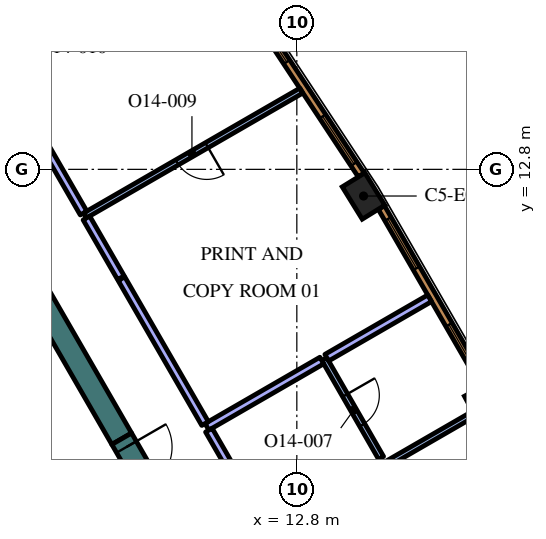
"""IFC4 building model, lengths in metres.
Left out: names, types, materials, properties, quantities, classifications, styles, units other than length and angle.
Written with IfcOpenShell. Run it as: python <this file> out.ifc"""

import sys

from ifc_helpers import new_model, si_unit, direction, frame, frame_2d, origin, origin_2d, place, context, subcontext, project, spatial, rectangle, extrude, element, fill, save


model = new_model("IFC4")
c1 = context("Model", 3, precision=1e-05, world=origin(), true_north=direction((0.0, 1.0)))
c2 = subcontext(c1, "Body", "Model", "MODEL_VIEW")
j1 = project(units=[si_unit("LENGTHUNIT", "METRE"), si_unit("PLANEANGLEUNIT", "RADIAN")], contexts=[c1])
p1 = place(None, origin())
s1 = spatial("IfcSite", under=j1, at=p1, CompositionType="ELEMENT")
p2 = place(p1, origin())
s2 = spatial("IfcBuilding", under=s1, at=p2, CompositionType="ELEMENT")
p3 = place(p2, frame((0.0, 0.0, 309.0)))
s3 = spatial("IfcBuildingStorey", under=s2, at=p3, CompositionType="ELEMENT", Elevation=309.0)
for number, where, z_axis, x_axis in (
    (1, (17.756, 6.557, 0.0), (0.0, 0.0, 1.0), (-0.474, 0.881, 0.0)),
    (2, (14.556, 12.098, 0.0), (0.0, 0.0, 1.0), (-0.526, 0.851, 0.0)),
):
    element("IfcColumn", number, at=place(p3, frame(where, z_axis=z_axis, x_axis=x_axis)), inside=s3, PredefinedType="COLUMN", context=c2, shape_type="SweptSolid", body=[
        extrude(rectangle(XDim=1.0, YDim=0.7, at=origin_2d()), origin(), (0.0, 0.0, 1.0), 4.2),
    ])
p4 = place(p3, frame((1.989, 16.456, 0.0), z_axis=(0.0, 0.0, 1.0), x_axis=(0.49999102663, -0.8660305845, 0.0)))
e3 = element("IfcWall", 3, at=p4, inside=s3, PredefinedType="SOLIDWALL", context=c2, shape_type="SweptSolid", body=[
    extrude(rectangle(XDim=12.406, YDim=0.6, at=frame_2d((6.203, 0.0))), origin(), (0.0, 0.0, 1.0), 4.2),
])
p5 = place(p3, frame((6.568, -3.627, 0.0), z_axis=(0.0, 0.0, 1.0), x_axis=(-0.499999455981, 0.866025717874, 0.0)))
e4 = element("IfcWall", 4, at=p5, inside=s3, PredefinedType="SOLIDWALL", context=c2, shape_type="SweptSolid", body=[
    extrude(rectangle(XDim=11.978, YDim=0.25, at=frame_2d((5.989, 0.0))), origin(), (0.0, 0.0, 1.0), 4.2),
])
p6 = place(p3, frame((8.565, -2.185, 0.0), z_axis=(0.0, 0.0, 1.0), x_axis=(-0.499997954832, 0.866026584559, 0.0)))
e5 = element("IfcWall", 5, at=p6, inside=s3, PredefinedType="SOLIDWALL", context=c2, shape_type="SweptSolid", body=[
    extrude(rectangle(XDim=12.35, YDim=0.25, at=frame_2d((6.175, 0.0))), origin(), (0.0, 0.0, 1.0), 4.2),
])
p7 = place(p6, frame((0.685, 0.0, 0.0)))
e6 = element("IfcOpeningElement", 6, at=p7, cuts=e5, PredefinedType="OPENING", context=c2, shape_type="SweptSolid", body=[
    extrude(rectangle(XDim=0.9, YDim=2.1, at=frame_2d((0.45, 1.05))), frame((0.0, 0.135, 0.0), z_axis=(0.0, -1.0, 0.0), x_axis=(1.0, 0.0, 0.0)), (0.0, 0.0, 1.0), 0.27),
])
p8 = place(p6, frame((3.105, 0.0, 0.0)))
e7 = element("IfcOpeningElement", 7, at=p8, cuts=e5, PredefinedType="OPENING", context=c2, shape_type="SweptSolid", body=[
    extrude(rectangle(XDim=1.1, YDim=2.1, at=frame_2d((0.55, 1.05))), frame((0.0, 0.135, 0.0), z_axis=(0.0, -1.0, 0.0), x_axis=(1.0, 0.0, 0.0)), (0.0, 0.0, 1.0), 0.27),
])
p9 = place(p6, frame((5.625, 0.0, 0.0)))
e8 = element("IfcOpeningElement", 8, at=p9, cuts=e5, PredefinedType="OPENING", context=c2, shape_type="SweptSolid", body=[
    extrude(rectangle(XDim=1.1, YDim=2.1, at=frame_2d((0.55, 1.05))), frame((0.0, 0.135, 0.0), z_axis=(0.0, -1.0, 0.0), x_axis=(1.0, 0.0, 0.0)), (0.0, 0.0, 1.0), 0.27),
])
p10 = place(p6, frame((8.145, 0.0, 0.0)))
e9 = element("IfcOpeningElement", 9, at=p10, cuts=e5, PredefinedType="OPENING", context=c2, shape_type="SweptSolid", body=[
    extrude(rectangle(XDim=1.1, YDim=2.1, at=frame_2d((0.55, 1.05))), frame((0.0, 0.135, 0.0), z_axis=(0.0, -1.0, 0.0), x_axis=(1.0, 0.0, 0.0)), (0.0, 0.0, 1.0), 0.27),
])
p11 = place(p6, frame((10.665, 0.0, 0.0)))
e10 = element("IfcOpeningElement", 10, at=p11, cuts=e5, PredefinedType="OPENING", context=c2, shape_type="SweptSolid", body=[
    extrude(rectangle(XDim=1.1, YDim=2.1, at=frame_2d((0.55, 1.05))), frame((0.0, 0.135, 0.0), z_axis=(0.0, -1.0, 0.0), x_axis=(1.0, 0.0, 0.0)), (0.0, 0.0, 1.0), 0.27),
])
p12 = place(p3, frame((8.192, 5.711, 0.0), z_axis=(0.0, 0.0, 1.0), x_axis=(0.500062241894, -0.865989465428, 0.0)))
e11 = element("IfcWall", 11, at=p12, inside=s3, PredefinedType="SOLIDWALL", context=c2, shape_type="SweptSolid", body=[
    extrude(rectangle(XDim=1.7, YDim=0.6, at=frame_2d((0.85, 0.0))), origin(), (0.0, 0.0, 1.0), 4.2),
])
p13 = place(p12, frame((0.25, 0.0, 0.0)))
e12 = element("IfcOpeningElement", 12, at=p13, cuts=e11, PredefinedType="OPENING", context=c2, shape_type="SweptSolid", body=[
    extrude(rectangle(XDim=1.2, YDim=2.1, at=frame_2d((0.6, 1.05))), frame((0.0, 0.31, 0.0), z_axis=(0.0, -1.0, 0.0), x_axis=(1.0, 0.0, 0.0)), (0.0, 0.0, 1.0), 0.62),
])
p14 = place(p3, frame((15.124, 5.022, 0.0), z_axis=(0.0, 0.0, 1.0), x_axis=(0.866010629317, 0.500025589255, 0.0)))
e13 = element("IfcWall", 13, at=p14, inside=s3, PredefinedType="PARTITIONING", context=c2, shape_type="SweptSolid", body=[
    extrude(rectangle(XDim=2.696, YDim=0.15, at=frame_2d((1.348, 0.0))), origin(), (0.0, 0.0, 1.0), 3.55),
])
p15 = place(p3, frame((13.523, 7.808, 0.0), z_axis=(0.0, 0.0, 1.0), x_axis=(0.498338040698, -0.866982812513, 0.0)))
e14 = element("IfcWall", 14, at=p15, inside=s3, PredefinedType="PARTITIONING", context=c2, shape_type="SweptSolid", body=[
    extrude(rectangle(XDim=2.999, YDim=0.15, at=frame_2d((1.5, 0.0))), origin(), (0.0, 0.0, 1.0), 3.55),
])
p16 = place(p15, frame((1.099, 0.0, 0.0)))
e15 = element("IfcOpeningElement", 15, at=p16, cuts=e14, PredefinedType="OPENING", context=c2, shape_type="SweptSolid", body=[
    extrude(rectangle(XDim=0.9, YDim=2.1, at=frame_2d((0.45, 1.05))), frame((0.0, 0.085, 0.0), z_axis=(0.0, -1.0, 0.0), x_axis=(1.0, 0.0, 0.0)), (0.0, 0.0, 1.0), 0.17),
])
p17 = place(p3, frame((13.588, 7.845, 0.0), z_axis=(0.0, 0.0, 1.0), x_axis=(0.866022959057, 0.500004234368, 0.0)))
e16 = element("IfcWall", 16, at=p17, inside=s3, PredefinedType="PARTITIONING", context=c2, shape_type="SweptSolid", body=[
    extrude(rectangle(XDim=3.125, YDim=0.2, at=frame_2d((1.562, 0.0))), origin(), (0.0, 0.0, 1.0), 3.55),
])
p18 = place(p3, frame((10.436, 6.025, 0.0), z_axis=(0.0, 0.0, 1.0), x_axis=(0.866030664334, 0.49999088835, 0.0)))
e17 = element("IfcWall", 17, at=p18, inside=s3, PredefinedType="PARTITIONING", context=c2, shape_type="SweptSolid", body=[
    extrude(rectangle(XDim=3.49, YDim=0.2, at=frame_2d((1.745, 0.0))), origin(), (0.0, 0.0, 1.0), 3.55),
])
p19 = place(p3, frame((12.686, 2.128, 0.0), z_axis=(0.0, 0.0, 1.0), x_axis=(-0.499988222896, 0.866032203192, 0.0)))
e18 = element("IfcWall", 18, at=p19, inside=s3, PredefinedType="PARTITIONING", context=c2, shape_type="SweptSolid", body=[
    extrude(rectangle(XDim=4.4, YDim=0.2, at=frame_2d((2.2, 0.0))), origin(), (0.0, 0.0, 1.0), 3.55),
])
p20 = place(p3, frame((12.918, 14.872, 0.0), z_axis=(0.0, 0.0, 1.0), x_axis=(-0.866033427365, -0.499986102494, 0.0)))
e19 = element("IfcWall", 19, at=p20, inside=s3, PredefinedType="PARTITIONING", context=c2, shape_type="SweptSolid", body=[
    extrude(rectangle(XDim=6.573, YDim=0.15, at=frame_2d((3.287, 0.0))), origin(), (0.0, 0.0, 1.0), 3.55),
])
p21 = place(p20, frame((2.873, 0.0, 0.0)))
e20 = element("IfcOpeningElement", 20, at=p21, cuts=e19, PredefinedType="OPENING", context=c2, shape_type="SweptSolid", body=[
    extrude(rectangle(XDim=0.9, YDim=2.1, at=frame_2d((0.45, 1.05))), frame((0.0, 0.085, 0.0), z_axis=(0.0, -1.0, 0.0), x_axis=(1.0, 0.0, 0.0)), (0.0, 0.0, 1.0), 0.17),
])
p22 = place(p3, frame((10.385, 6.112, 0.0), z_axis=(0.0, 0.0, 1.0), x_axis=(-0.499988222896, 0.866032203192, 0.0)))
e21 = element("IfcWall", 21, at=p22, inside=s3, PredefinedType="PARTITIONING", context=c2, shape_type="SweptSolid", body=[
    extrude(rectangle(XDim=4.4, YDim=0.2, at=frame_2d((2.2, 0.0))), origin(), (0.0, 0.0, 1.0), 3.55),
])
p23 = place(p3, frame((8.171, 9.948, 0.0), z_axis=(0.0, 0.0, 1.0), x_axis=(-0.500044545065, 0.865999684151, 0.0)))
e22 = element("IfcWall", 22, at=p23, inside=s3, PredefinedType="PARTITIONING", context=c2, shape_type="SweptSolid", body=[
    extrude(rectangle(XDim=1.815, YDim=0.2, at=frame_2d((0.908, 0.0))), origin(), (0.0, 0.0, 1.0), 3.55),
])
p24 = place(p3, frame((7.188, 11.65, 0.0), z_axis=(0.0, 0.0, 1.0), x_axis=(-0.499986368499, 0.866033273792, 0.0)))
e23 = element("IfcWall", 23, at=p24, inside=s3, PredefinedType="PARTITIONING", context=c2, shape_type="SweptSolid", body=[
    extrude(rectangle(XDim=7.794, YDim=0.2, at=frame_2d((3.897, 0.0))), origin(), (0.0, 0.0, 1.0), 3.55),
])
p25 = place(p24, frame((3.4, 0.0, 0.0)))
e24 = element("IfcOpeningElement", 24, at=p25, cuts=e23, PredefinedType="OPENING", context=c2, shape_type="SweptSolid", body=[
    extrude(rectangle(XDim=1.0, YDim=2.1, at=frame_2d((0.5, 1.05))), frame((0.0, 0.11, 0.0), z_axis=(0.0, -1.0, 0.0), x_axis=(1.0, 0.0, 0.0)), (0.0, 0.0, 1.0), 0.22),
])
p26 = place(p3, frame((17.728, 7.114, 0.0), z_axis=(0.0, 0.0, 1.0), x_axis=(-0.500024767483, 0.866011103799, 0.0)))
e25 = element("IfcWall", 25, at=p26, inside=s3, PredefinedType="SOLIDWALL", context=c2, shape_type="SweptSolid", body=[
    extrude(rectangle(XDim=5.406, YDim=0.19, at=frame_2d((2.703, 0.0))), origin(), (0.0, 0.0, 1.0), 3.95),
])
p27 = place(p26, frame((0.346, 0.0, 0.6)))
e26 = element("IfcOpeningElement", 26, at=p27, cuts=e25, PredefinedType="OPENING", context=c2, shape_type="SweptSolid", body=[
    extrude(rectangle(XDim=1.5, YDim=2.85, at=frame_2d((0.75, 1.425))), frame((0.0, 0.105, 0.0), z_axis=(0.0, -1.0, 0.0), x_axis=(1.0, 0.0, 0.0)), (0.0, 0.0, 1.0), 0.21),
])
p28 = place(p26, frame((3.56, 0.0, 0.6)))
e27 = element("IfcOpeningElement", 27, at=p28, cuts=e25, PredefinedType="OPENING", context=c2, shape_type="SweptSolid", body=[
    extrude(rectangle(XDim=1.5, YDim=2.85, at=frame_2d((0.75, 1.425))), frame((0.0, 0.105, 0.0), z_axis=(0.0, -1.0, 0.0), x_axis=(1.0, 0.0, 0.0)), (0.0, 0.0, 1.0), 0.21),
])
p29 = place(p3, frame((14.496, 12.653, 0.0), z_axis=(0.0, 0.0, 1.0), x_axis=(-0.550744054781, 0.83467417962, 0.0)))
e28 = element("IfcWall", 28, at=p29, inside=s3, PredefinedType="SOLIDWALL", context=c2, shape_type="SweptSolid", body=[
    extrude(rectangle(XDim=5.406, YDim=0.19, at=frame_2d((2.703, 0.0))), origin(), (0.0, 0.0, 1.0), 3.95),
])
p30 = place(p29, frame((0.346, 0.0, 0.6)))
e29 = element("IfcOpeningElement", 29, at=p30, cuts=e28, PredefinedType="OPENING", context=c2, shape_type="SweptSolid", body=[
    extrude(rectangle(XDim=1.5, YDim=2.85, at=frame_2d((0.75, 1.425))), frame((0.0, 0.105, 0.0), z_axis=(0.0, -1.0, 0.0), x_axis=(1.0, 0.0, 0.0)), (0.0, 0.0, 1.0), 0.21),
])
p31 = place(p29, frame((3.559, 0.0, 0.6)))
e30 = element("IfcOpeningElement", 30, at=p31, cuts=e28, PredefinedType="OPENING", context=c2, shape_type="SweptSolid", body=[
    extrude(rectangle(XDim=1.5, YDim=2.85, at=frame_2d((0.75, 1.425))), frame((0.0, 0.105, 0.0), z_axis=(0.0, -1.0, 0.0), x_axis=(1.0, 0.0, 0.0)), (0.0, 0.0, 1.0), 0.21),
])
p32 = place(p13, origin())
e31 = element("IfcDoor", 31, at=p32, inside=s3, OperationType="SINGLE_SWING_LEFT", PredefinedType="DOOR", context=c2, shape_type="SweptSolid", body=[
    extrude(rectangle(XDim=1.2, YDim=2.1, at=frame_2d((0.6, 1.05))), frame((0.0, 0.025, 0.0), z_axis=(0.0, -1.0, 0.0), x_axis=(1.0, 0.0, 0.0)), (0.0, 0.0, 1.0), 0.05),
])
fill(e12, e31)
p33 = place(p16, origin())
e32 = element("IfcDoor", 32, at=p33, inside=s3, OperationType="SINGLE_SWING_RIGHT", PredefinedType="DOOR", context=c2, shape_type="SweptSolid", body=[
    extrude(rectangle(XDim=0.9, YDim=2.1, at=frame_2d((0.45, 1.05))), frame((0.0, 0.025, 0.0), z_axis=(0.0, -1.0, 0.0), x_axis=(1.0, 0.0, 0.0)), (0.0, 0.0, 1.0), 0.05),
])
fill(e15, e32)
p34 = place(p21, origin())
e33 = element("IfcDoor", 33, at=p34, inside=s3, OperationType="SINGLE_SWING_RIGHT", PredefinedType="DOOR", context=c2, shape_type="SweptSolid", body=[
    extrude(rectangle(XDim=0.9, YDim=2.1, at=frame_2d((0.45, 1.05))), frame((0.0, 0.025, 0.0), z_axis=(0.0, -1.0, 0.0), x_axis=(1.0, 0.0, 0.0)), (0.0, 0.0, 1.0), 0.05),
])
fill(e20, e33)
p35 = place(p27, origin())
e34 = element("IfcWindow", 34, at=p35, inside=s3, PartitioningType="SINGLE_PANEL", PredefinedType="WINDOW", context=c2, shape_type="SweptSolid", body=[
    extrude(rectangle(XDim=1.5, YDim=2.85, at=frame_2d((0.75, 1.425))), frame((0.0, 0.045, 0.0), z_axis=(0.0, -1.0, 0.0), x_axis=(1.0, 0.0, 0.0)), (0.0, 0.0, 1.0), 0.06),
])
fill(e26, e34)
p36 = place(p28, origin())
e35 = element("IfcWindow", 35, at=p36, inside=s3, PartitioningType="SINGLE_PANEL", PredefinedType="WINDOW", context=c2, shape_type="SweptSolid", body=[
    extrude(rectangle(XDim=1.5, YDim=2.85, at=frame_2d((0.75, 1.425))), frame((0.0, 0.045, 0.0), z_axis=(0.0, -1.0, 0.0), x_axis=(1.0, 0.0, 0.0)), (0.0, 0.0, 1.0), 0.06),
])
fill(e27, e35)
p37 = place(p30, origin())
e36 = element("IfcWindow", 36, at=p37, inside=s3, PartitioningType="SINGLE_PANEL", PredefinedType="WINDOW", context=c2, shape_type="SweptSolid", body=[
    extrude(rectangle(XDim=1.5, YDim=2.85, at=frame_2d((0.75, 1.425))), frame((0.0, 0.045, 0.0), z_axis=(0.0, -1.0, 0.0), x_axis=(1.0, 0.0, 0.0)), (0.0, 0.0, 1.0), 0.06),
])
fill(e29, e36)
p38 = place(p31, origin())
e37 = element("IfcWindow", 37, at=p38, inside=s3, PartitioningType="SINGLE_PANEL", PredefinedType="WINDOW", context=c2, shape_type="SweptSolid", body=[
    extrude(rectangle(XDim=1.5, YDim=2.85, at=frame_2d((0.75, 1.425))), frame((0.0, 0.045, 0.0), z_axis=(0.0, -1.0, 0.0), x_axis=(1.0, 0.0, 0.0)), (0.0, 0.0, 1.0), 0.06),
])
fill(e30, e37)
save(model, sys.argv[1])
